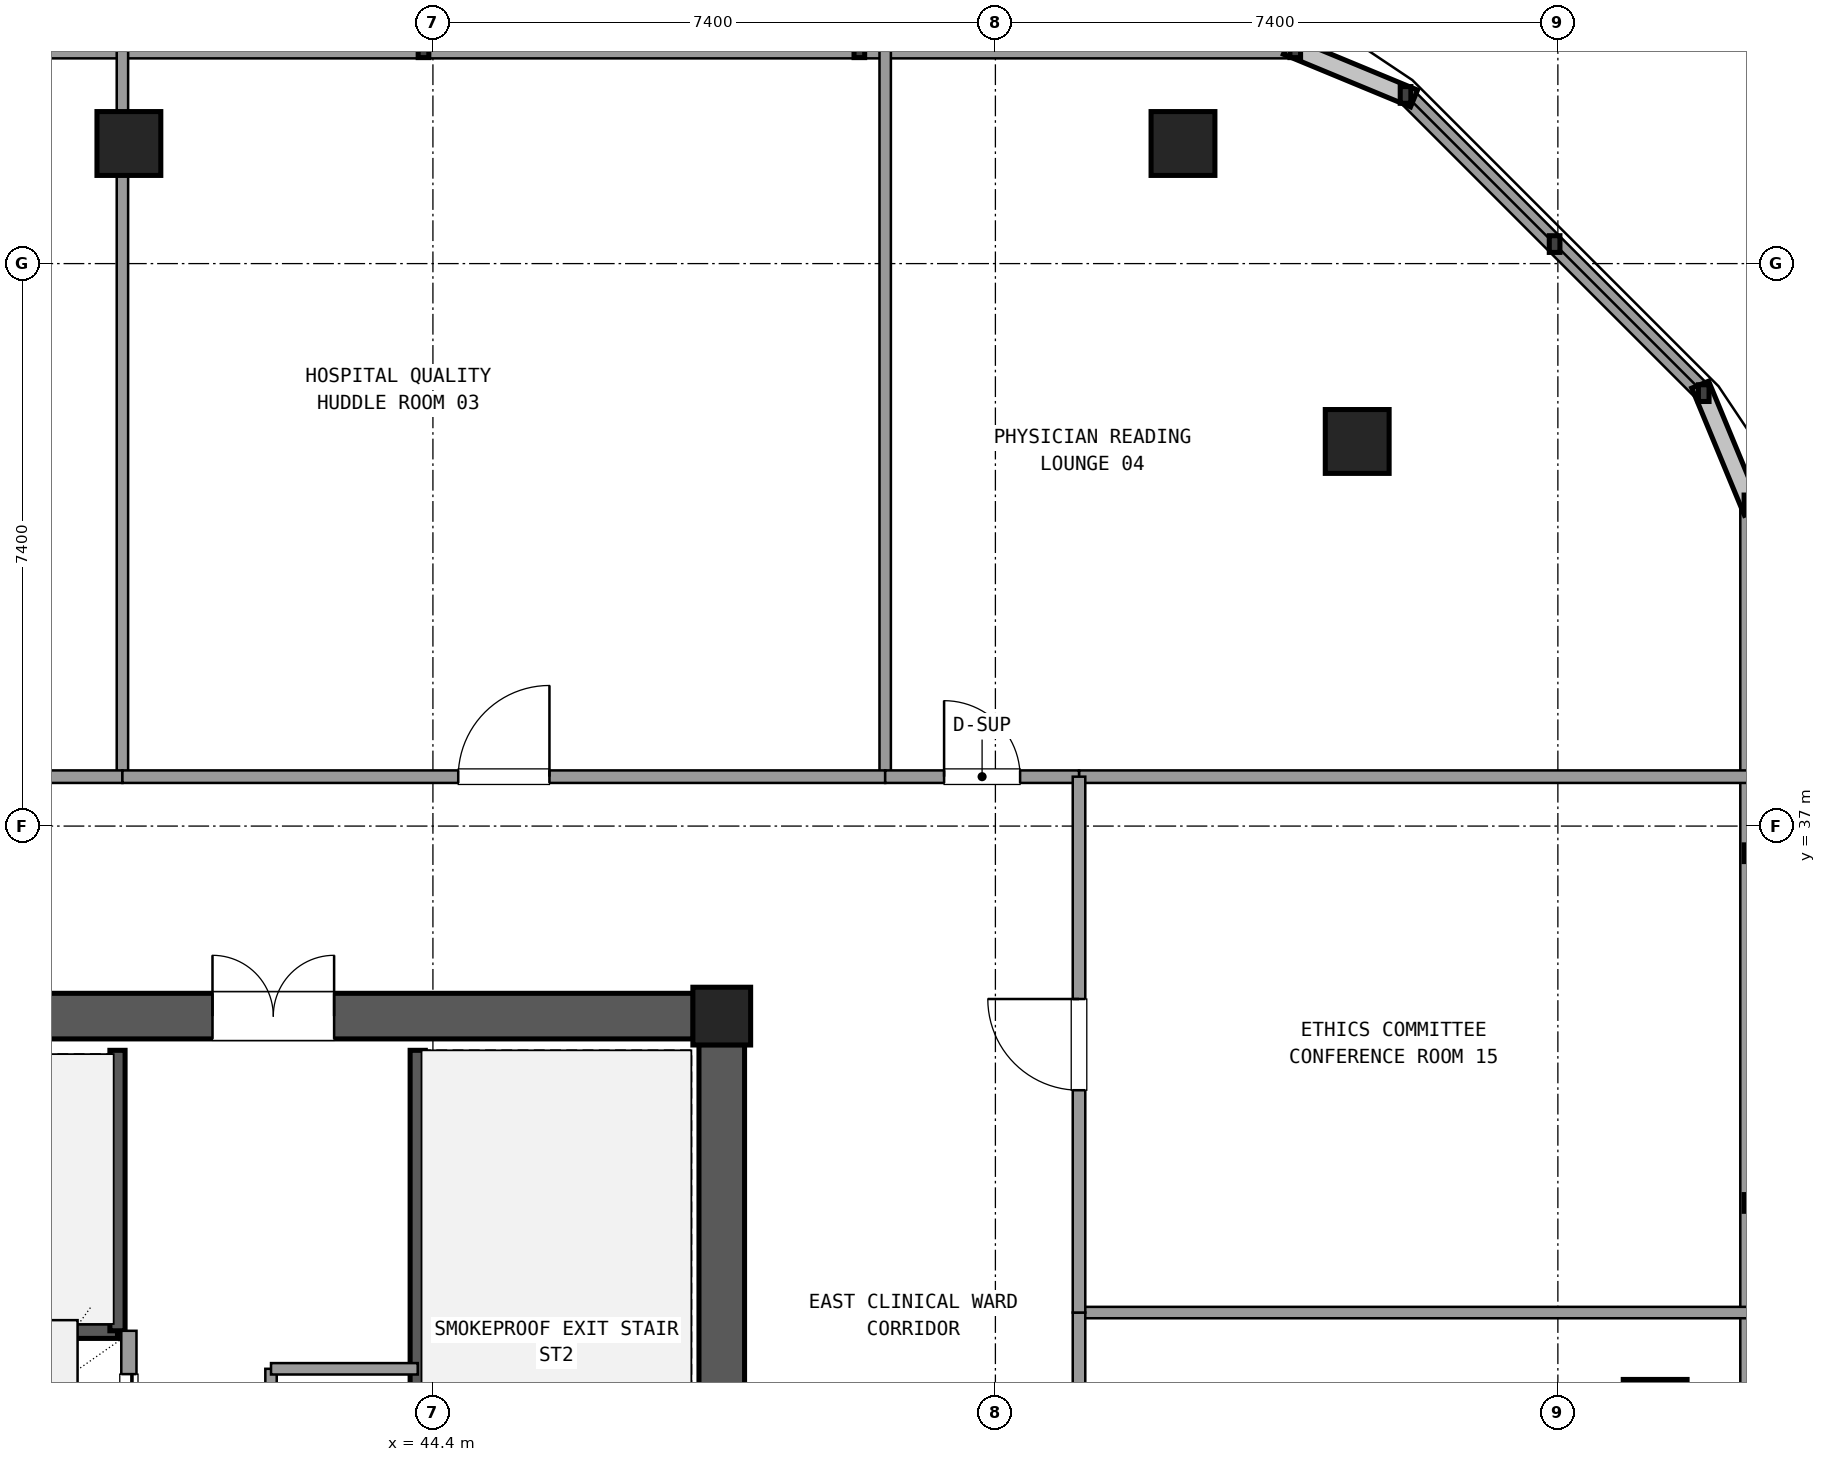
"""IFC4 building model, lengths in metres.
Left out: names, types, materials, properties, quantities, classifications, styles, units other than length and angle.
Written with IfcOpenShell. Run it as: python <this file> out.ifc"""

import sys

from ifc_helpers import new_model, si_unit, direction, frame, frame_2d, origin, origin_2d, place, context, subcontext, project, spatial, rectangle, extrude, element, fill, save


model = new_model("IFC4")
c1 = context("Model", 3, precision=1e-05, world=origin(), true_north=direction((0.0, 1.0)))
c2 = subcontext(c1, "Body", "Model", "MODEL_VIEW")
j1 = project(units=[si_unit("LENGTHUNIT", "METRE"), si_unit("PLANEANGLEUNIT", "RADIAN")], contexts=[c1])
p1 = place(None, origin())
s1 = spatial("IfcSite", under=j1, at=p1, CompositionType="ELEMENT")
p2 = place(p1, origin())
s2 = spatial("IfcBuilding", under=s1, at=p2, CompositionType="ELEMENT")
p3 = place(p2, frame((0.0, 0.0, 275.22)))
s3 = spatial("IfcBuildingStorey", under=s2, at=p3, CompositionType="ELEMENT", Elevation=275.22)
p4 = place(p3, frame((48.2, 34.5, 0.0), z_axis=(0.0, 0.0, 1.0), x_axis=(1.0, 0.0, 0.0)))
e1 = element("IfcColumn", 1, at=p4, inside=s3, PredefinedType="COLUMN", context=c2, shape_type="SweptSolid", body=[
    extrude(rectangle(XDim=0.76, YDim=0.76, at=origin_2d()), origin(), (0.0, 0.0, 1.0), 3.6),
])
p5 = place(p3, frame((48.2, 26.275, 0.0), z_axis=(0.0, 0.0, 1.0), x_axis=(0.0, 1.0, 0.0)))
e2 = element("IfcWall", 2, at=p5, inside=s3, PredefinedType="SHEAR", context=c2, shape_type="SweptSolid", body=[
    extrude(rectangle(XDim=7.85, YDim=0.6, at=frame_2d((3.925, 0.0))), origin(), (0.0, 0.0, 1.0), 3.32),
])
p6 = place(p3, frame((47.825, 34.5, 0.0), z_axis=(0.0, 0.0, 1.0), x_axis=(-1.0, 0.0, 0.0)))
e3 = element("IfcWall", 3, at=p6, inside=s3, PredefinedType="SHEAR", context=c2, shape_type="SweptSolid", body=[
    extrude(rectangle(XDim=10.45, YDim=0.6, at=frame_2d((5.225, 0.0))), origin(), (0.0, 0.0, 1.0), 3.32),
])
p7 = place(p6, frame((4.725, 0.0, 0.0)))
e4 = element("IfcOpeningElement", 4, at=p7, cuts=e3, PredefinedType="OPENING", context=c2, shape_type="SweptSolid", body=[
    extrude(rectangle(XDim=1.6, YDim=2.2, at=frame_2d((0.8, 1.1))), frame((0.0, 0.31, 0.0), z_axis=(0.0, -1.0, 0.0), x_axis=(1.0, 0.0, 0.0)), (0.0, 0.0, 1.0), 0.62),
])
for number, where, z_axis, x_axis in (
    (5, (60.48, 29.3, 0.0), (0.0, 0.0, 1.0), (1.0, 0.0, 0.0)),
    (6, (56.56, 42.06, 0.0), (0.0, 0.0, 1.0), (1.0, 0.0, 0.0)),
    (7, (54.268, 45.98, 0.0), (0.0, 0.0, 1.0), (1.0, 0.0, 0.0)),
    (8, (40.4, 45.98, 0.0), (0.0, 0.0, 1.0), (1.0, 0.0, 0.0)),
):
    element("IfcColumn", number, at=place(p3, frame(where, z_axis=z_axis, x_axis=x_axis)), inside=s3, PredefinedType="COLUMN", context=c2, shape_type="SweptSolid", body=[
        extrude(rectangle(XDim=0.84, YDim=0.84, at=origin_2d()), origin(), (0.0, 0.0, 1.0), 3.6),
    ])
p8 = place(p3, frame((61.72, 27.44, 0.0), z_axis=(0.0, 0.0, 1.0), x_axis=(0.0, 1.0, 0.0)))
e9 = element("IfcWall", 9, at=p8, inside=s3, PredefinedType="SOLIDWALL", context=c2, shape_type="SweptSolid", body=[
    extrude(rectangle(XDim=13.805, YDim=0.24, at=frame_2d((6.903, 0.0))), origin(), (0.0, 0.0, 1.0), 0.85),
])
p9 = place(p3, frame((61.119, 42.696, 0.0), z_axis=(0.0, 0.0, 1.0), x_axis=(-0.707106781187, 0.707106781187, 0.0)))
e10 = element("IfcWall", 10, at=p9, inside=s3, PredefinedType="SOLIDWALL", context=c2, shape_type="SweptSolid", body=[
    extrude(rectangle(XDim=5.548, YDim=0.24, at=frame_2d((2.774, 0.0))), origin(), (0.0, 0.0, 1.0), 0.85),
])
p10 = place(p3, frame((55.745, 47.22, 0.0), z_axis=(0.0, 0.0, 1.0), x_axis=(-1.0, 0.0, 0.0)))
e11 = element("IfcWall", 11, at=p10, inside=s3, PredefinedType="SOLIDWALL", context=c2, shape_type="SweptSolid", body=[
    extrude(rectangle(XDim=17.204, YDim=0.24, at=frame_2d((8.602, 0.0))), origin(), (0.0, 0.0, 1.0), 0.85),
])
p11 = place(p3, frame((44.2, 24.65, 0.0), z_axis=(0.0, 0.0, 1.0), x_axis=(0.0, 1.0, 0.0)))
e12 = element("IfcWall", 12, at=p11, inside=s3, PredefinedType="SHEAR", context=c2, shape_type="SweptSolid", body=[
    extrude(rectangle(XDim=9.4, YDim=0.2, at=frame_2d((4.7, 0.0))), origin(), (0.0, 0.0, 1.0), 3.32),
])
p12 = place(p3, frame((30.75, 30.36, 0.0), z_axis=(0.0, 0.0, 1.0), x_axis=(1.0, 0.0, 0.0)))
e13 = element("IfcWall", 13, at=p12, inside=s3, PredefinedType="SHEAR", context=c2, shape_type="SweptSolid", body=[
    extrude(rectangle(XDim=9.5, YDim=0.2, at=frame_2d((4.75, 0.0))), origin(), (0.0, 0.0, 1.0), 3.32),
])
p13 = place(p3, frame((40.25, 30.36, 0.0), z_axis=(0.0, 0.0, 1.0), x_axis=(0.0, 1.0, 0.0)))
e14 = element("IfcWall", 14, at=p13, inside=s3, PredefinedType="SHEAR", context=c2, shape_type="SweptSolid", body=[
    extrude(rectangle(XDim=3.69, YDim=0.2, at=frame_2d((1.845, 0.0))), origin(), (0.0, 0.0, 1.0), 3.32),
])
p14 = place(p3, frame((40.4, 23.54, 0.0), z_axis=(0.0, 0.0, 1.0), x_axis=(0.0, 1.0, 0.0)))
e15 = element("IfcWall", 15, at=p14, inside=s3, PredefinedType="SOLIDWALL", context=c2, shape_type="SweptSolid", body=[
    extrude(rectangle(XDim=6.82, YDim=0.2, at=frame_2d((3.41, 0.0))), origin(), (0.0, 0.0, 1.0), 2.61),
])
p15 = place(p14, frame((0.35, 0.0, 0.0)))
e16 = element("IfcOpeningElement", 16, at=p15, cuts=e15, PredefinedType="OPENING", context=c2, shape_type="SweptSolid", body=[
    extrude(rectangle(XDim=1.4, YDim=2.2, at=frame_2d((0.7, 1.1))), frame((0.0, 0.11, 0.0), z_axis=(0.0, -1.0, 0.0), x_axis=(1.0, 0.0, 0.0)), (0.0, 0.0, 1.0), 0.22),
])
p16 = place(p14, frame((2.65, 0.0, 0.0)))
e17 = element("IfcOpeningElement", 17, at=p16, cuts=e15, PredefinedType="OPENING", context=c2, shape_type="SweptSolid", body=[
    extrude(rectangle(XDim=1.4, YDim=2.2, at=frame_2d((0.7, 1.1))), frame((0.0, 0.11, 0.0), z_axis=(0.0, -1.0, 0.0), x_axis=(1.0, 0.0, 0.0)), (0.0, 0.0, 1.0), 0.22),
])
p17 = place(p14, frame((4.85, 0.0, 0.0)))
e18 = element("IfcOpeningElement", 18, at=p17, cuts=e15, PredefinedType="OPENING", context=c2, shape_type="SweptSolid", body=[
    extrude(rectangle(XDim=1.4, YDim=2.2, at=frame_2d((0.7, 1.1))), frame((0.0, 0.11, 0.0), z_axis=(0.0, -1.0, 0.0), x_axis=(1.0, 0.0, 0.0)), (0.0, 0.0, 1.0), 0.22),
])
p18 = place(p3, frame((42.27, 25.04, 0.0), z_axis=(0.0, 0.0, 1.0), x_axis=(0.0, 1.0, 0.0)))
e19 = element("IfcWall", 19, at=p18, inside=s3, PredefinedType="PARTITIONING", context=c2, shape_type="SweptSolid", body=[
    extrude(rectangle(XDim=4.82, YDim=0.15, at=frame_2d((2.41, 0.0))), origin(), (0.0, 0.0, 1.0), 2.61),
])
p19 = place(p18, frame((0.55, 0.0, 0.0)))
e20 = element("IfcOpeningElement", 20, at=p19, cuts=e19, PredefinedType="OPENING", context=c2, shape_type="SweptSolid", body=[
    extrude(rectangle(XDim=1.0, YDim=2.15, at=frame_2d((0.5, 1.075))), frame((0.0, 0.085, 0.0), z_axis=(0.0, -1.0, 0.0), x_axis=(1.0, 0.0, 0.0)), (0.0, 0.0, 1.0), 0.17),
])
p20 = place(p3, frame((42.27, 29.86, 0.0), z_axis=(0.0, 0.0, 1.0), x_axis=(1.0, 0.0, 0.0)))
e21 = element("IfcWall", 21, at=p20, inside=s3, PredefinedType="PARTITIONING", context=c2, shape_type="SweptSolid", body=[
    extrude(rectangle(XDim=1.93, YDim=0.15, at=frame_2d((0.965, 0.0))), origin(), (0.0, 0.0, 1.0), 2.61),
])
p21 = place(p3, frame((52.9, 37.65, 0.0), z_axis=(0.0, 0.0, 1.0), x_axis=(1.0, 0.0, 0.0)))
e22 = element("IfcWall", 22, at=p21, inside=s3, PredefinedType="PARTITIONING", context=c2, shape_type="SweptSolid", body=[
    extrude(rectangle(XDim=8.8, YDim=0.165, at=frame_2d((4.4, 0.0))), origin(), (0.0, 0.0, 1.0), 2.61),
])
p22 = place(p3, frame((40.315, 37.65, 0.0), z_axis=(0.0, 0.0, 1.0), x_axis=(0.0, 1.0, 0.0)))
e23 = element("IfcWall", 23, at=p22, inside=s3, PredefinedType="PARTITIONING", context=c2, shape_type="SweptSolid", body=[
    extrude(rectangle(XDim=9.55, YDim=0.15, at=frame_2d((4.775, 0.0))), origin(), (0.0, 0.0, 1.0), 2.61),
])
p23 = place(p3, frame((27.528, 37.65, 0.0), z_axis=(0.0, 0.0, 1.0), x_axis=(1.0, 0.0, 0.0)))
e24 = element("IfcWall", 24, at=p23, inside=s3, PredefinedType="PARTITIONING", context=c2, shape_type="SweptSolid", body=[
    extrude(rectangle(XDim=12.787, YDim=0.165, at=frame_2d((6.394, 0.0))), origin(), (0.0, 0.0, 1.0), 2.61),
])
p24 = place(p23, frame((5.793, 0.0, 0.0)))
e25 = element("IfcOpeningElement", 25, at=p24, cuts=e24, PredefinedType="OPENING", context=c2, shape_type="SweptSolid", body=[
    extrude(rectangle(XDim=1.2, YDim=2.15, at=frame_2d((0.6, 1.075))), frame((0.0, 0.093, 0.0), z_axis=(0.0, -1.0, 0.0), x_axis=(1.0, 0.0, 0.0)), (0.0, 0.0, 1.0), 0.185),
])
p25 = place(p3, frame((50.35, 37.65, 0.0), z_axis=(0.0, 0.0, 1.0), x_axis=(0.0, 1.0, 0.0)))
e26 = element("IfcWall", 26, at=p25, inside=s3, PredefinedType="PARTITIONING", context=c2, shape_type="SweptSolid", body=[
    extrude(rectangle(XDim=9.55, YDim=0.15, at=frame_2d((4.775, 0.0))), origin(), (0.0, 0.0, 1.0), 2.61),
])
p26 = place(p3, frame((40.315, 37.65, 0.0), z_axis=(0.0, 0.0, 1.0), x_axis=(1.0, 0.0, 0.0)))
e27 = element("IfcWall", 27, at=p26, inside=s3, PredefinedType="PARTITIONING", context=c2, shape_type="SweptSolid", body=[
    extrude(rectangle(XDim=10.035, YDim=0.165, at=frame_2d((5.018, 0.0))), origin(), (0.0, 0.0, 1.0), 2.61),
])
p27 = place(p26, frame((4.418, 0.0, 0.0)))
e28 = element("IfcOpeningElement", 28, at=p27, cuts=e27, PredefinedType="OPENING", context=c2, shape_type="SweptSolid", body=[
    extrude(rectangle(XDim=1.2, YDim=2.15, at=frame_2d((0.6, 1.075))), frame((0.0, 0.093, 0.0), z_axis=(0.0, -1.0, 0.0), x_axis=(1.0, 0.0, 0.0)), (0.0, 0.0, 1.0), 0.185),
])
p28 = place(p3, frame((50.35, 37.65, 0.0), z_axis=(0.0, 0.0, 1.0), x_axis=(1.0, 0.0, 0.0)))
e29 = element("IfcWall", 29, at=p28, inside=s3, PredefinedType="PARTITIONING", context=c2, shape_type="SweptSolid", body=[
    extrude(rectangle(XDim=2.55, YDim=0.165, at=frame_2d((1.275, 0.0))), origin(), (0.0, 0.0, 1.0), 2.61),
])
p29 = place(p28, frame((0.775, 0.0, 0.0)))
e30 = element("IfcOpeningElement", 30, at=p29, cuts=e29, PredefinedType="OPENING", context=c2, shape_type="SweptSolid", body=[
    extrude(rectangle(XDim=1.0, YDim=2.15, at=frame_2d((0.5, 1.075))), frame((0.0, 0.093, 0.0), z_axis=(0.0, -1.0, 0.0), x_axis=(1.0, 0.0, 0.0)), (0.0, 0.0, 1.0), 0.185),
])
p30 = place(p3, frame((52.9, 30.6, 0.0), z_axis=(0.0, 0.0, 1.0), x_axis=(1.0, 0.0, 0.0)))
e31 = element("IfcWall", 31, at=p30, inside=s3, PredefinedType="PARTITIONING", context=c2, shape_type="SweptSolid", body=[
    extrude(rectangle(XDim=8.8, YDim=0.15, at=frame_2d((4.4, 0.0))), origin(), (0.0, 0.0, 1.0), 2.61),
])
p31 = place(p3, frame((52.9, 24.1, 0.0), z_axis=(0.0, 0.0, 1.0), x_axis=(0.0, 1.0, 0.0)))
e32 = element("IfcWall", 32, at=p31, inside=s3, PredefinedType="PARTITIONING", context=c2, shape_type="SweptSolid", body=[
    extrude(rectangle(XDim=6.5, YDim=0.165, at=frame_2d((3.25, 0.0))), origin(), (0.0, 0.0, 1.0), 2.61),
])
p32 = place(p31, frame((2.65, 0.0, 0.0)))
e33 = element("IfcOpeningElement", 33, at=p32, cuts=e32, PredefinedType="OPENING", context=c2, shape_type="SweptSolid", body=[
    extrude(rectangle(XDim=1.2, YDim=2.15, at=frame_2d((0.6, 1.075))), frame((0.0, 0.093, 0.0), z_axis=(0.0, -1.0, 0.0), x_axis=(1.0, 0.0, 0.0)), (0.0, 0.0, 1.0), 0.185),
])
p33 = place(p3, frame((52.9, 30.6, 0.0), z_axis=(0.0, 0.0, 1.0), x_axis=(0.0, 1.0, 0.0)))
e34 = element("IfcWall", 34, at=p33, inside=s3, PredefinedType="PARTITIONING", context=c2, shape_type="SweptSolid", body=[
    extrude(rectangle(XDim=7.05, YDim=0.165, at=frame_2d((3.525, 0.0))), origin(), (0.0, 0.0, 1.0), 2.61),
])
p34 = place(p33, frame((2.925, 0.0, 0.0)))
e35 = element("IfcOpeningElement", 35, at=p34, cuts=e34, PredefinedType="OPENING", context=c2, shape_type="SweptSolid", body=[
    extrude(rectangle(XDim=1.2, YDim=2.15, at=frame_2d((0.6, 1.075))), frame((0.0, 0.093, 0.0), z_axis=(0.0, -1.0, 0.0), x_axis=(1.0, 0.0, 0.0)), (0.0, 0.0, 1.0), 0.185),
])
p35 = place(p7, frame((1.6, 0.0, 0.0), z_axis=(0.0, 0.0, 1.0), x_axis=(-1.0, 0.0, 0.0)))
e36 = element("IfcDoor", 36, at=p35, inside=s3, OperationType="DOUBLE_DOOR_SINGLE_SWING", PredefinedType="DOOR", context=c2, shape_type="SweptSolid", body=[
    extrude(rectangle(XDim=1.6, YDim=2.2, at=frame_2d((0.8, 1.1))), frame((0.0, 0.025, 0.0), z_axis=(0.0, -1.0, 0.0), x_axis=(1.0, 0.0, 0.0)), (0.0, 0.0, 1.0), 0.05),
])
fill(e4, e36)
p36 = place(p17, origin())
e37 = element("IfcDoor", 37, at=p36, inside=s3, OperationType="SLIDING_TO_RIGHT", PredefinedType="DOOR", context=c2, shape_type="SweptSolid", body=[
    extrude(rectangle(XDim=1.4, YDim=2.2, at=frame_2d((0.7, 1.1))), frame((0.0, 0.025, 0.0), z_axis=(0.0, -1.0, 0.0), x_axis=(1.0, 0.0, 0.0)), (0.0, 0.0, 1.0), 0.05),
])
fill(e18, e37)
p37 = place(p27, origin())
e38 = element("IfcDoor", 38, at=p37, inside=s3, OperationType="SINGLE_SWING_RIGHT", PredefinedType="DOOR", context=c2, shape_type="SweptSolid", body=[
    extrude(rectangle(XDim=1.2, YDim=2.15, at=frame_2d((0.6, 1.075))), frame((0.0, 0.025, 0.0), z_axis=(0.0, -1.0, 0.0), x_axis=(1.0, 0.0, 0.0)), (0.0, 0.0, 1.0), 0.05),
])
fill(e28, e38)
p38 = place(p29, origin())
e39 = element("IfcDoor", 39, at=p38, inside=s3, OperationType="SINGLE_SWING_LEFT", PredefinedType="DOOR", context=c2, shape_type="SweptSolid", body=[
    extrude(rectangle(XDim=1.0, YDim=2.15, at=frame_2d((0.5, 1.075))), frame((0.0, 0.025, 0.0), z_axis=(0.0, -1.0, 0.0), x_axis=(1.0, 0.0, 0.0)), (0.0, 0.0, 1.0), 0.05),
])
fill(e30, e39)
p39 = place(p34, origin())
e40 = element("IfcDoor", 40, at=p39, inside=s3, OperationType="SINGLE_SWING_RIGHT", PredefinedType="DOOR", context=c2, shape_type="SweptSolid", body=[
    extrude(rectangle(XDim=1.2, YDim=2.15, at=frame_2d((0.6, 1.075))), frame((0.0, 0.025, 0.0), z_axis=(0.0, -1.0, 0.0), x_axis=(1.0, 0.0, 0.0)), (0.0, 0.0, 1.0), 0.05),
])
fill(e35, e40)
save(model, sys.argv[1])
